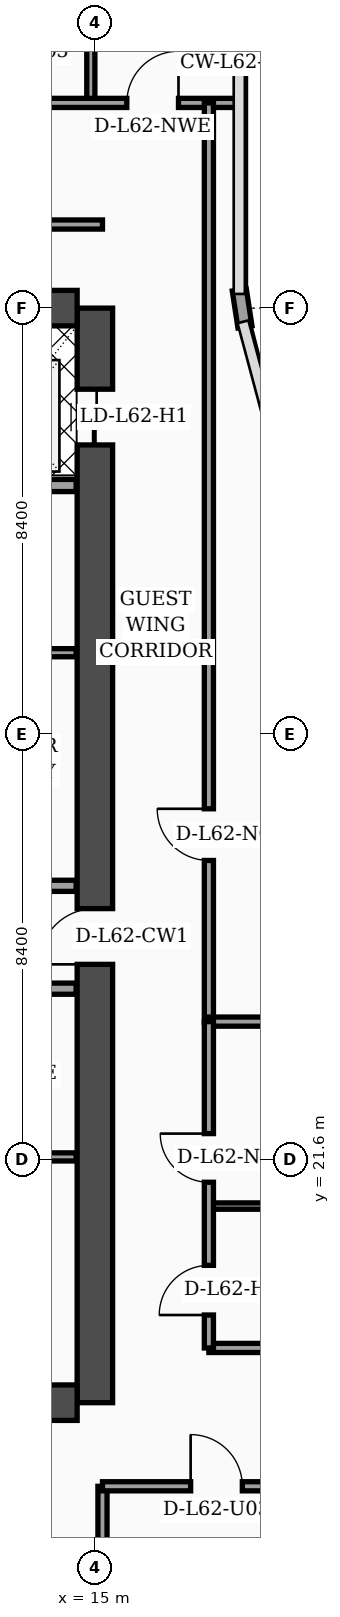
"""IFC4 building model, lengths in metres.
Left out: names, types, materials, properties, quantities, classifications, styles, units other than length and angle.
Written with IfcOpenShell. Run it as: python <this file> out.ifc"""

import sys

from ifc_helpers import new_model, si_unit, direction, frame, frame_2d, origin, place, context, subcontext, project, spatial, rectangle, extrude, element, fill, save


model = new_model("IFC4")
c1 = context("Model", 3, precision=1e-05, world=origin(), true_north=direction((0.0, 1.0)))
c2 = subcontext(c1, "Body", "Model", "MODEL_VIEW")
j1 = project(units=[si_unit("LENGTHUNIT", "METRE"), si_unit("PLANEANGLEUNIT", "RADIAN")], contexts=[c1])
p1 = place(None, origin())
s1 = spatial("IfcSite", under=j1, at=p1, CompositionType="ELEMENT")
p2 = place(p1, origin())
s2 = spatial("IfcBuilding", under=s1, at=p2, CompositionType="ELEMENT")
p3 = place(p2, frame((0.0, 0.0, 251.4)))
s3 = spatial("IfcBuildingStorey", under=s2, at=p3, CompositionType="ELEMENT", Elevation=251.4)
p4 = place(p3, frame((15.0, 16.8, 0.0), z_axis=(0.0, 0.0, 1.0), x_axis=(0.0, 1.0, 0.0)))
e1 = element("IfcWall", 1, at=p4, inside=s3, PredefinedType="SHEAR", context=c2, shape_type="SweptSolid", body=[
    extrude(rectangle(XDim=21.6, YDim=0.7, at=frame_2d((10.8, 0.0))), origin(), (0.0, 0.0, 1.0), 3.56),
])
p5 = place(p4, frame((8.65, 0.0, 0.0)))
e2 = element("IfcOpeningElement", 2, at=p5, cuts=e1, PredefinedType="OPENING", context=c2, shape_type="SweptSolid", body=[
    extrude(rectangle(XDim=1.1, YDim=2.2, at=frame_2d((0.55, 1.1))), frame((0.0, 0.36, 0.0), z_axis=(0.0, -1.0, 0.0), x_axis=(1.0, 0.0, 0.0)), (0.0, 0.0, 1.0), 0.72),
])
p6 = place(p4, frame((18.9, 0.0, 0.0)))
e3 = element("IfcOpeningElement", 3, at=p6, cuts=e1, PredefinedType="OPENING", context=c2, shape_type="SweptSolid", body=[
    extrude(rectangle(XDim=1.1, YDim=2.2, at=frame_2d((0.55, 1.1))), frame((0.0, 0.36, 0.0), z_axis=(0.0, -1.0, 0.0), x_axis=(1.0, 0.0, 0.0)), (0.0, 0.0, 1.0), 0.72),
])
p7 = place(p3, frame((4.55, 38.4, 0.0), z_axis=(0.0, 0.0, 1.0), x_axis=(1.0, 0.0, 0.0)))
e4 = element("IfcWall", 4, at=p7, inside=s3, PredefinedType="SHEAR", context=c2, shape_type="SweptSolid", body=[
    extrude(rectangle(XDim=10.1, YDim=0.7, at=frame_2d((5.05, 0.0))), origin(), (0.0, 0.0, 1.0), 3.56),
])
p8 = place(p7, frame((5.75, 0.0, 0.0)))
e5 = element("IfcOpeningElement", 5, at=p8, cuts=e4, PredefinedType="OPENING", context=c2, shape_type="SweptSolid", body=[
    extrude(rectangle(XDim=1.1, YDim=2.2, at=frame_2d((0.55, 1.1))), frame((0.0, 0.36, 0.0), z_axis=(0.0, -1.0, 0.0), x_axis=(1.0, 0.0, 0.0)), (0.0, 0.0, 1.0), 0.72),
])
p9 = place(p3, frame((4.55, 16.8, 0.0), z_axis=(0.0, 0.0, 1.0), x_axis=(1.0, 0.0, 0.0)))
e6 = element("IfcWall", 6, at=p9, inside=s3, PredefinedType="SHEAR", context=c2, shape_type="SweptSolid", body=[
    extrude(rectangle(XDim=10.1, YDim=0.7, at=frame_2d((5.05, 0.0))), origin(), (0.0, 0.0, 1.0), 3.56),
])
p10 = place(p3, frame((17.962, 38.03, 0.0), z_axis=(0.0, 0.0, 1.0), x_axis=(-0.15141125477, 0.988470855377, 0.0)))
e7 = element("IfcWall", 7, at=p10, inside=s3, PredefinedType="SOLIDWALL", context=c2, shape_type="SweptSolid", body=[
    extrude(rectangle(XDim=0.739, YDim=0.28, at=frame_2d((0.369, 0.0))), origin(), (0.0, 0.0, 1.0), 3.56),
])
p11 = place(p3, frame((9.68, 21.65, 0.0), z_axis=(0.0, 0.0, 1.0), x_axis=(1.0, 0.0, 0.0)))
e8 = element("IfcWall", 8, at=p11, inside=s3, PredefinedType="PARTITIONING", context=c2, shape_type="SweptSolid", body=[
    extrude(rectangle(XDim=4.95, YDim=0.16, at=frame_2d((2.475, 0.0))), origin(), (0.0, 0.0, 1.0), 3.09),
])
p12 = place(p11, frame((1.1, 0.0, 0.0)))
e9 = element("IfcOpeningElement", 9, at=p12, cuts=e8, PredefinedType="OPENING", context=c2, shape_type="SweptSolid", body=[
    extrude(rectangle(XDim=0.98, YDim=2.15, at=frame_2d((0.49, 1.075))), frame((0.0, 0.09, 0.0), z_axis=(0.0, -1.0, 0.0), x_axis=(1.0, 0.0, 0.0)), (0.0, 0.0, 1.0), 0.18),
])
p13 = place(p3, frame((9.68, 24.97, 0.0), z_axis=(0.0, 0.0, 1.0), x_axis=(1.0, 0.0, 0.0)))
e10 = element("IfcWall", 10, at=p13, inside=s3, PredefinedType="SOLIDWALL", context=c2, shape_type="SweptSolid", body=[
    extrude(rectangle(XDim=4.95, YDim=0.22, at=frame_2d((2.475, 0.0))), origin(), (0.0, 0.0, 1.0), 2.99),
])
p14 = place(p13, frame((0.9, 0.0, 0.0)))
e11 = element("IfcOpeningElement", 11, at=p14, cuts=e10, PredefinedType="OPENING", context=c2, shape_type="SweptSolid", body=[
    extrude(rectangle(XDim=0.98, YDim=2.15, at=frame_2d((0.49, 1.075))), frame((0.0, 0.12, 0.0), z_axis=(0.0, -1.0, 0.0), x_axis=(1.0, 0.0, 0.0)), (0.0, 0.0, 1.0), 0.24),
])
p15 = place(p3, frame((12.25, 27.0, 0.0), z_axis=(0.0, 0.0, 1.0), x_axis=(1.0, 0.0, 0.0)))
e12 = element("IfcWall", 12, at=p15, inside=s3, PredefinedType="SOLIDWALL", context=c2, shape_type="SweptSolid", body=[
    extrude(rectangle(XDim=2.38, YDim=0.22, at=frame_2d((1.19, 0.0))), origin(), (0.0, 0.0, 1.0), 3.56),
])
p16 = place(p3, frame((12.25, 31.6, 0.0), z_axis=(0.0, 0.0, 1.0), x_axis=(1.0, 0.0, 0.0)))
e13 = element("IfcWall", 13, at=p16, inside=s3, PredefinedType="PARTITIONING", context=c2, shape_type="SweptSolid", body=[
    extrude(rectangle(XDim=2.38, YDim=0.16, at=frame_2d((1.19, 0.0))), origin(), (0.0, 0.0, 1.0), 3.14),
])
p17 = place(p16, frame((0.55, 0.0, 0.0)))
e14 = element("IfcOpeningElement", 14, at=p17, cuts=e13, PredefinedType="OPENING", context=c2, shape_type="SweptSolid", body=[
    extrude(rectangle(XDim=0.98, YDim=2.15, at=frame_2d((0.49, 1.075))), frame((0.0, 0.09, 0.0), z_axis=(0.0, -1.0, 0.0), x_axis=(1.0, 0.0, 0.0)), (0.0, 0.0, 1.0), 0.18),
])
p18 = place(p3, frame((9.66, 34.9, 0.0), z_axis=(0.0, 0.0, 1.0), x_axis=(1.0, 0.0, 0.0)))
e15 = element("IfcWall", 15, at=p18, inside=s3, PredefinedType="SOLIDWALL", context=c2, shape_type="SweptSolid", body=[
    extrude(rectangle(XDim=4.97, YDim=0.24, at=frame_2d((2.485, 0.0))), origin(), (0.0, 0.0, 1.0), 3.56),
])
p19 = place(p3, frame((15.15, 2.44, 0.0), z_axis=(0.0, 0.0, 1.0), x_axis=(0.0, 1.0, 0.0)))
e16 = element("IfcWall", 16, at=p19, inside=s3, PredefinedType="PARTITIONING", context=c2, shape_type="SweptSolid", body=[
    extrude(rectangle(XDim=12.71, YDim=0.18, at=frame_2d((6.355, 0.0))), origin(), (0.0, 0.0, 1.0), 3.09),
])
p20 = place(p3, frame((15.15, 15.15, 0.0), z_axis=(0.0, 0.0, 1.0), x_axis=(1.0, 0.0, 0.0)))
e17 = element("IfcWall", 17, at=p20, inside=s3, PredefinedType="PARTITIONING", context=c2, shape_type="SweptSolid", body=[
    extrude(rectangle(XDim=6.45, YDim=0.18, at=frame_2d((3.225, 0.0))), origin(), (0.0, 0.0, 1.0), 2.59),
])
p21 = place(p20, frame((1.74, 0.0, 0.0)))
e18 = element("IfcOpeningElement", 18, at=p21, cuts=e17, PredefinedType="OPENING", context=c2, shape_type="SweptSolid", body=[
    extrude(rectangle(XDim=1.02, YDim=2.2, at=frame_2d((0.51, 1.1))), frame((0.0, 0.1, 0.0), z_axis=(0.0, -1.0, 0.0), x_axis=(1.0, 0.0, 0.0)), (0.0, 0.0, 1.0), 0.2),
])
p22 = place(p3, frame((14.92, 42.45, 0.0), z_axis=(0.0, 0.0, 1.0), x_axis=(0.0, 1.0, 0.0)))
e19 = element("IfcWall", 19, at=p22, inside=s3, PredefinedType="PARTITIONING", context=c2, shape_type="SweptSolid", body=[
    extrude(rectangle(XDim=5.35, YDim=0.16, at=frame_2d((2.675, 0.0))), origin(), (0.0, 0.0, 1.0), 3.09),
])
p23 = place(p3, frame((0.08, 42.45, 0.0), z_axis=(0.0, 0.0, 1.0), x_axis=(1.0, 0.0, 0.0)))
e20 = element("IfcWall", 20, at=p23, inside=s3, PredefinedType="PARTITIONING", context=c2, shape_type="SweptSolid", body=[
    extrude(rectangle(XDim=17.77, YDim=0.18, at=frame_2d((8.885, 0.0))), origin(), (0.0, 0.0, 1.0), 2.99),
])
p24 = place(p23, frame((0.9, 0.0, 0.0)))
e21 = element("IfcOpeningElement", 21, at=p24, cuts=e20, PredefinedType="OPENING", context=c2, shape_type="SweptSolid", body=[
    extrude(rectangle(XDim=1.02, YDim=2.2, at=frame_2d((0.51, 1.1))), frame((0.0, 0.1, 0.0), z_axis=(0.0, -1.0, 0.0), x_axis=(1.0, 0.0, 0.0)), (0.0, 0.0, 1.0), 0.2),
])
p25 = place(p23, frame((4.45, 0.0, 0.0)))
e22 = element("IfcOpeningElement", 22, at=p25, cuts=e20, PredefinedType="OPENING", context=c2, shape_type="SweptSolid", body=[
    extrude(rectangle(XDim=1.02, YDim=2.2, at=frame_2d((0.51, 1.1))), frame((0.0, 0.1, 0.0), z_axis=(0.0, -1.0, 0.0), x_axis=(1.0, 0.0, 0.0)), (0.0, 0.0, 1.0), 0.2),
])
p26 = place(p23, frame((10.33, 0.0, 0.0)))
e23 = element("IfcOpeningElement", 23, at=p26, cuts=e20, PredefinedType="OPENING", context=c2, shape_type="SweptSolid", body=[
    extrude(rectangle(XDim=1.02, YDim=2.2, at=frame_2d((0.51, 1.1))), frame((0.0, 0.1, 0.0), z_axis=(0.0, -1.0, 0.0), x_axis=(1.0, 0.0, 0.0)), (0.0, 0.0, 1.0), 0.2),
])
p27 = place(p23, frame((15.55, 0.0, 0.0)))
e24 = element("IfcOpeningElement", 24, at=p27, cuts=e20, PredefinedType="OPENING", context=c2, shape_type="SweptSolid", body=[
    extrude(rectangle(XDim=1.02, YDim=2.2, at=frame_2d((0.51, 1.1))), frame((0.0, 0.1, 0.0), z_axis=(0.0, -1.0, 0.0), x_axis=(1.0, 0.0, 0.0)), (0.0, 0.0, 1.0), 0.2),
])
p28 = place(p3, frame((17.25, 24.3, 0.0), z_axis=(0.0, 0.0, 1.0), x_axis=(0.0, 1.0, 0.0)))
e25 = element("IfcWall", 25, at=p28, inside=s3, PredefinedType="PARTITIONING", context=c2, shape_type="SweptSolid", body=[
    extrude(rectangle(XDim=18.15, YDim=0.18, at=frame_2d((9.075, 0.0))), origin(), (0.0, 0.0, 1.0), 2.99),
])
p29 = place(p28, frame((3.2, 0.0, 0.0)))
e26 = element("IfcOpeningElement", 26, at=p29, cuts=e25, PredefinedType="OPENING", context=c2, shape_type="SweptSolid", body=[
    extrude(rectangle(XDim=1.02, YDim=2.2, at=frame_2d((0.51, 1.1))), frame((0.0, 0.1, 0.0), z_axis=(0.0, -1.0, 0.0), x_axis=(1.0, 0.0, 0.0)), (0.0, 0.0, 1.0), 0.2),
])
p30 = place(p3, frame((3.83, 40.05, 0.0), z_axis=(0.0, 0.0, 1.0), x_axis=(1.0, 0.0, 0.0)))
e27 = element("IfcWall", 27, at=p30, inside=s3, PredefinedType="PARTITIONING", context=c2, shape_type="SweptSolid", body=[
    extrude(rectangle(XDim=11.32, YDim=0.18, at=frame_2d((5.66, 0.0))), origin(), (0.0, 0.0, 1.0), 2.99),
])
p31 = place(p3, frame((17.25, 17.88, 0.0), z_axis=(0.0, 0.0, 1.0), x_axis=(1.0, 0.0, 0.0)))
e28 = element("IfcWall", 28, at=p31, inside=s3, PredefinedType="PARTITIONING", context=c2, shape_type="SweptSolid", body=[
    extrude(rectangle(XDim=4.3, YDim=0.18, at=frame_2d((2.15, 0.0))), origin(), (0.0, 0.0, 1.0), 3.56),
])
p32 = place(p3, frame((17.25, 20.68, 0.0), z_axis=(0.0, 0.0, 1.0), x_axis=(1.0, 0.0, 0.0)))
e29 = element("IfcWall", 29, at=p32, inside=s3, PredefinedType="PARTITIONING", context=c2, shape_type="SweptSolid", body=[
    extrude(rectangle(XDim=4.3, YDim=0.125, at=frame_2d((2.15, 0.0))), origin(), (0.0, 0.0, 1.0), 3.56),
])
p33 = place(p3, frame((17.25, 24.32, 0.0), z_axis=(0.0, 0.0, 1.0), x_axis=(1.0, 0.0, 0.0)))
e30 = element("IfcWall", 30, at=p33, inside=s3, PredefinedType="PARTITIONING", context=c2, shape_type="SweptSolid", body=[
    extrude(rectangle(XDim=4.35, YDim=0.18, at=frame_2d((2.175, 0.0))), origin(), (0.0, 0.0, 1.0), 3.56),
])
p34 = place(p3, frame((17.25, 17.88, 0.0), z_axis=(0.0, 0.0, 1.0), x_axis=(0.0, 1.0, 0.0)))
e31 = element("IfcWall", 31, at=p34, inside=s3, PredefinedType="PARTITIONING", context=c2, shape_type="SweptSolid", body=[
    extrude(rectangle(XDim=6.44, YDim=0.18, at=frame_2d((3.22, 0.0))), origin(), (0.0, 0.0, 1.0), 3.09),
])
p35 = place(p34, frame((0.65, 0.0, 0.0)))
e32 = element("IfcOpeningElement", 32, at=p35, cuts=e31, PredefinedType="OPENING", context=c2, shape_type="SweptSolid", body=[
    extrude(rectangle(XDim=0.98, YDim=2.15, at=frame_2d((0.49, 1.075))), frame((0.0, 0.1, 0.0), z_axis=(0.0, -1.0, 0.0), x_axis=(1.0, 0.0, 0.0)), (0.0, 0.0, 1.0), 0.2),
])
p36 = place(p34, frame((3.27, 0.0, 0.0)))
e33 = element("IfcOpeningElement", 33, at=p36, cuts=e31, PredefinedType="OPENING", context=c2, shape_type="SweptSolid", body=[
    extrude(rectangle(XDim=0.96, YDim=2.2, at=frame_2d((0.48, 1.1))), frame((0.0, 0.1, 0.0), z_axis=(0.0, -1.0, 0.0), x_axis=(1.0, 0.0, 0.0)), (0.0, 0.0, 1.0), 0.2),
])
p37 = place(p21, origin())
e34 = element("IfcDoor", 34, at=p37, inside=s3, OperationType="SINGLE_SWING_LEFT", PredefinedType="DOOR", context=c2, shape_type="SweptSolid", body=[
    extrude(rectangle(XDim=1.02, YDim=2.2, at=frame_2d((0.51, 1.1))), frame((0.0, 0.025, 0.0), z_axis=(0.0, -1.0, 0.0), x_axis=(1.0, 0.0, 0.0)), (0.0, 0.0, 1.0), 0.05),
])
fill(e18, e34)
p38 = place(p27, origin())
e35 = element("IfcDoor", 35, at=p38, inside=s3, OperationType="SINGLE_SWING_RIGHT", PredefinedType="DOOR", context=c2, shape_type="SweptSolid", body=[
    extrude(rectangle(XDim=1.02, YDim=2.2, at=frame_2d((0.51, 1.1))), frame((0.0, 0.025, 0.0), z_axis=(0.0, -1.0, 0.0), x_axis=(1.0, 0.0, 0.0)), (0.0, 0.0, 1.0), 0.05),
])
fill(e24, e35)
p39 = place(p29, origin())
e36 = element("IfcDoor", 36, at=p39, inside=s3, OperationType="SINGLE_SWING_RIGHT", PredefinedType="DOOR", context=c2, shape_type="SweptSolid", body=[
    extrude(rectangle(XDim=1.02, YDim=2.2, at=frame_2d((0.51, 1.1))), frame((0.0, 0.025, 0.0), z_axis=(0.0, -1.0, 0.0), x_axis=(1.0, 0.0, 0.0)), (0.0, 0.0, 1.0), 0.05),
])
fill(e26, e36)
p40 = place(p35, origin())
e37 = element("IfcDoor", 37, at=p40, inside=s3, OperationType="SINGLE_SWING_LEFT", PredefinedType="DOOR", context=c2, shape_type="SweptSolid", body=[
    extrude(rectangle(XDim=0.98, YDim=2.15, at=frame_2d((0.49, 1.075))), frame((0.0, 0.025, 0.0), z_axis=(0.0, -1.0, 0.0), x_axis=(1.0, 0.0, 0.0)), (0.0, 0.0, 1.0), 0.05),
])
fill(e32, e37)
p41 = place(p36, origin())
e38 = element("IfcDoor", 38, at=p41, inside=s3, OperationType="SINGLE_SWING_RIGHT", PredefinedType="DOOR", context=c2, shape_type="SweptSolid", body=[
    extrude(rectangle(XDim=0.96, YDim=2.2, at=frame_2d((0.48, 1.1))), frame((0.0, 0.025, 0.0), z_axis=(0.0, -1.0, 0.0), x_axis=(1.0, 0.0, 0.0)), (0.0, 0.0, 1.0), 0.05),
])
fill(e33, e38)
p42 = place(p5, origin())
e39 = element("IfcDoor", 39, at=p42, inside=s3, OperationType="SINGLE_SWING_LEFT", PredefinedType="DOOR", context=c2, shape_type="SweptSolid", body=[
    extrude(rectangle(XDim=1.1, YDim=2.2, at=frame_2d((0.55, 1.1))), frame((0.0, 0.025, 0.0), z_axis=(0.0, -1.0, 0.0), x_axis=(1.0, 0.0, 0.0)), (0.0, 0.0, 1.0), 0.05),
])
fill(e2, e39)
p43 = place(p6, origin())
e40 = element("IfcDoor", 40, at=p43, inside=s3, OperationType="DOUBLE_DOOR_SLIDING", PredefinedType="DOOR", context=c2, shape_type="SweptSolid", body=[
    extrude(rectangle(XDim=1.1, YDim=2.2, at=frame_2d((0.55, 1.1))), frame((0.0, 0.025, 0.0), z_axis=(0.0, -1.0, 0.0), x_axis=(1.0, 0.0, 0.0)), (0.0, 0.0, 1.0), 0.05),
])
fill(e3, e40)
save(model, sys.argv[1])
